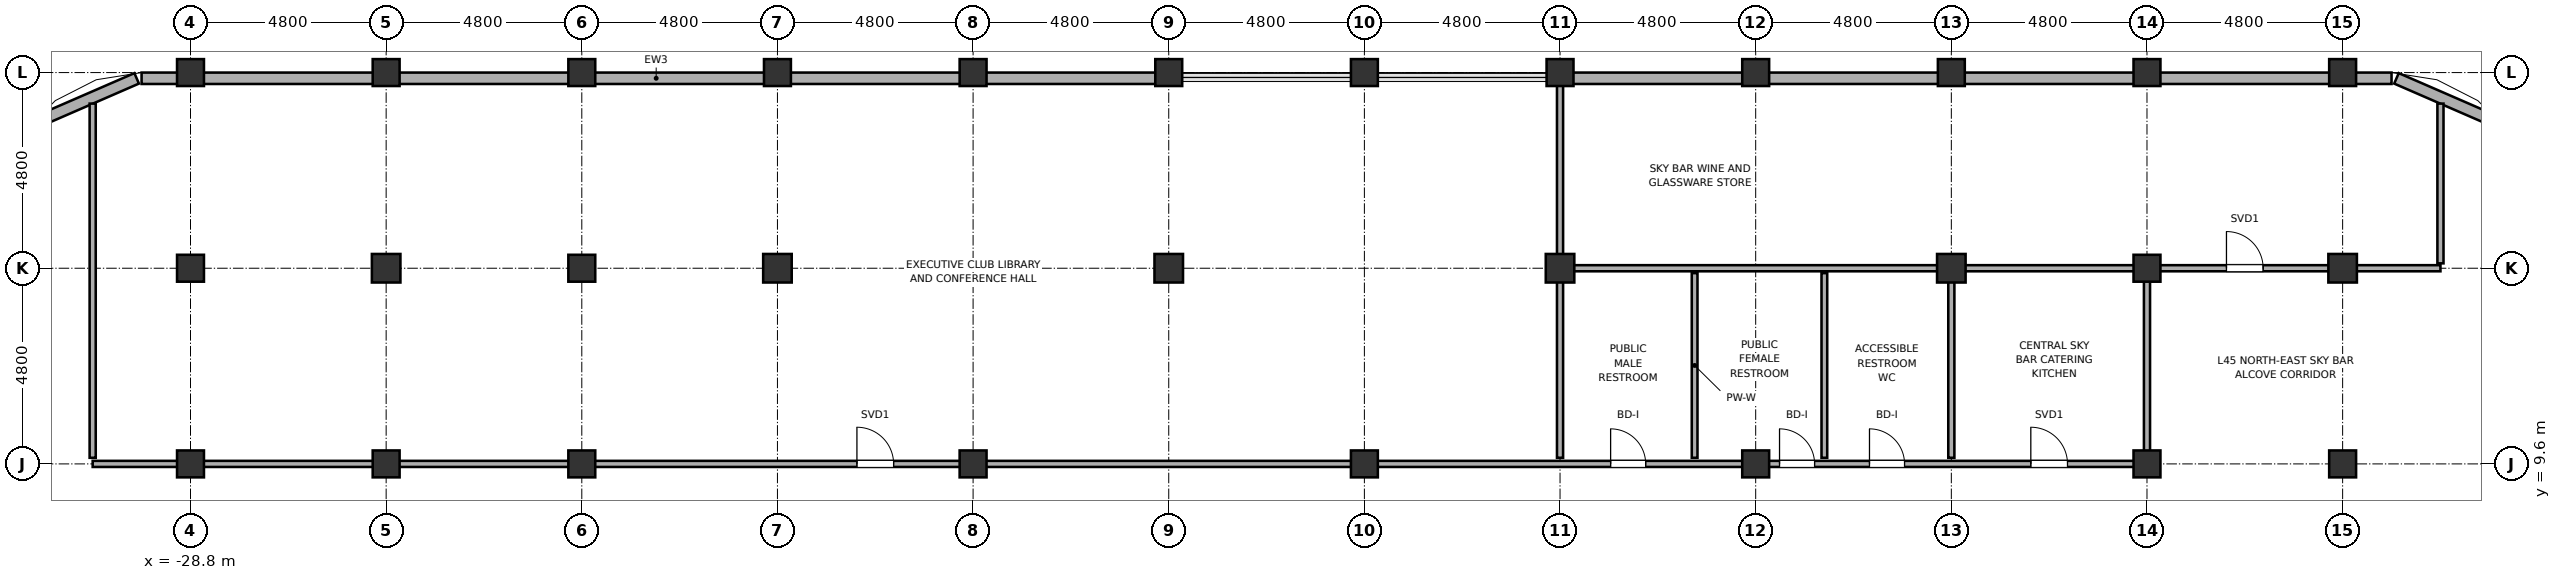
"""IFC4 building model, lengths in metres.
Left out: names, types, materials, properties, quantities, classifications, styles, units other than length and angle.
Written with IfcOpenShell. Run it as: python <this file> out.ifc"""

import sys

from ifc_helpers import new_model, si_unit, direction, frame, frame_2d, origin, origin_2d, place, context, subcontext, project, spatial, rectangle, hollow_rectangle, hollow_circle, extrude, element, fill, save


model = new_model("IFC4")
c1 = context("Model", 3, precision=1e-05, world=origin(), true_north=direction((0.0, 1.0)))
c2 = subcontext(c1, "Body", "Model", "MODEL_VIEW")
j1 = project(units=[si_unit("LENGTHUNIT", "METRE"), si_unit("PLANEANGLEUNIT", "RADIAN")], contexts=[c1])
p1 = place(None, origin())
s1 = spatial("IfcSite", under=j1, at=p1, CompositionType="ELEMENT")
p2 = place(p1, origin())
s2 = spatial("IfcBuilding", under=s1, at=p2, CompositionType="ELEMENT")
p3 = place(p2, frame((0.0, 0.0, 180.3)))
s3 = spatial("IfcBuildingStorey", under=s2, at=p3, CompositionType="ELEMENT", Elevation=180.3)
for number, where, z_axis, x_axis in (
    (1, (-28.8, 9.6, 0.0), (0.0, 0.0, 1.0), (1.0, 0.0, 0.0)),
    (2, (-28.8, 14.4, 0.0), (0.0, 0.0, 1.0), (1.0, 0.0, 0.0)),
    (3, (-28.8, 19.2, 0.0), (0.0, 0.0, 1.0), (1.0, 0.0, 0.0)),
    (4, (-24.0, 9.6, 0.0), (0.0, 0.0, 1.0), (1.0, 0.0, 0.0)),
):
    element("IfcColumn", number, at=place(p3, frame(where, z_axis=z_axis, x_axis=x_axis)), inside=s3, PredefinedType="COLUMN", context=c2, shape_type="SweptSolid", body=[
        extrude(hollow_circle(Radius=0.33, WallThickness=0.028, at=origin_2d()), origin(), (0.0, 0.0, 1.0), 5.2),
    ])
p4 = place(p3, frame((-24.0, 14.4, 0.0), z_axis=(0.0, 0.0, 1.0), x_axis=(1.0, 0.0, 0.0)))
e5 = element("IfcColumn", 5, at=p4, inside=s3, PredefinedType="COLUMN", context=c2, shape_type="SweptSolid", body=[
    extrude(hollow_rectangle(XDim=0.7, YDim=0.7, WallThickness=0.032, at=origin_2d()), origin(), (0.0, 0.0, 1.0), 5.2),
])
for number, where, z_axis, x_axis in (
    (6, (-24.0, 19.2, 0.0), (0.0, 0.0, 1.0), (1.0, 0.0, 0.0)),
    (7, (-19.2, 9.6, 0.0), (0.0, 0.0, 1.0), (1.0, 0.0, 0.0)),
    (8, (-19.2, 14.4, 0.0), (0.0, 0.0, 1.0), (1.0, 0.0, 0.0)),
    (9, (-19.2, 19.2, 0.0), (0.0, 0.0, 1.0), (1.0, 0.0, 0.0)),
):
    element("IfcColumn", number, at=place(p3, frame(where, z_axis=z_axis, x_axis=x_axis)), inside=s3, PredefinedType="COLUMN", context=c2, shape_type="SweptSolid", body=[
        extrude(hollow_circle(Radius=0.33, WallThickness=0.028, at=origin_2d()), origin(), (0.0, 0.0, 1.0), 5.2),
    ])
p5 = place(p3, frame((-14.4, 14.4, 0.0), z_axis=(0.0, 0.0, 1.0), x_axis=(1.0, 0.0, 0.0)))
e10 = element("IfcColumn", 10, at=p5, inside=s3, PredefinedType="COLUMN", context=c2, shape_type="SweptSolid", body=[
    extrude(hollow_rectangle(XDim=0.7, YDim=0.7, WallThickness=0.032, at=origin_2d()), origin(), (0.0, 0.0, 1.0), 5.2),
])
for number, where, z_axis, x_axis in (
    (11, (-14.4, 19.2, 0.0), (0.0, 0.0, 1.0), (1.0, 0.0, 0.0)),
    (12, (-9.6, 9.6, 0.0), (0.0, 0.0, 1.0), (1.0, 0.0, 0.0)),
    (13, (-9.6, 19.2, 0.0), (0.0, 0.0, 1.0), (1.0, 0.0, 0.0)),
):
    element("IfcColumn", number, at=place(p3, frame(where, z_axis=z_axis, x_axis=x_axis)), inside=s3, PredefinedType="COLUMN", context=c2, shape_type="SweptSolid", body=[
        extrude(hollow_circle(Radius=0.33, WallThickness=0.028, at=origin_2d()), origin(), (0.0, 0.0, 1.0), 5.2),
    ])
p6 = place(p3, frame((-4.8, 14.4, 0.0), z_axis=(0.0, 0.0, 1.0), x_axis=(1.0, 0.0, 0.0)))
e14 = element("IfcColumn", 14, at=p6, inside=s3, PredefinedType="COLUMN", context=c2, shape_type="SweptSolid", body=[
    extrude(hollow_rectangle(XDim=0.7, YDim=0.7, WallThickness=0.032, at=origin_2d()), origin(), (0.0, 0.0, 1.0), 5.2),
])
for number, where, z_axis, x_axis in (
    (15, (-4.8, 19.2, 0.0), (0.0, 0.0, 1.0), (1.0, 0.0, 0.0)),
    (16, (0.0, 9.6, 0.0), (0.0, 0.0, 1.0), (1.0, 0.0, 0.0)),
    (17, (0.0, 19.2, 0.0), (0.0, 0.0, 1.0), (1.0, 0.0, 0.0)),
):
    element("IfcColumn", number, at=place(p3, frame(where, z_axis=z_axis, x_axis=x_axis)), inside=s3, PredefinedType="COLUMN", context=c2, shape_type="SweptSolid", body=[
        extrude(hollow_circle(Radius=0.33, WallThickness=0.028, at=origin_2d()), origin(), (0.0, 0.0, 1.0), 5.2),
    ])
p7 = place(p3, frame((4.8, 14.4, 0.0), z_axis=(0.0, 0.0, 1.0), x_axis=(1.0, 0.0, 0.0)))
e18 = element("IfcColumn", 18, at=p7, inside=s3, PredefinedType="COLUMN", context=c2, shape_type="SweptSolid", body=[
    extrude(hollow_rectangle(XDim=0.7, YDim=0.7, WallThickness=0.032, at=origin_2d()), origin(), (0.0, 0.0, 1.0), 5.2),
])
for number, where, z_axis, x_axis in (
    (19, (4.8, 19.2, 0.0), (0.0, 0.0, 1.0), (1.0, 0.0, 0.0)),
    (20, (9.6, 9.6, 0.0), (0.0, 0.0, 1.0), (1.0, 0.0, 0.0)),
    (21, (9.6, 19.2, 0.0), (0.0, 0.0, 1.0), (1.0, 0.0, 0.0)),
):
    element("IfcColumn", number, at=place(p3, frame(where, z_axis=z_axis, x_axis=x_axis)), inside=s3, PredefinedType="COLUMN", context=c2, shape_type="SweptSolid", body=[
        extrude(hollow_circle(Radius=0.33, WallThickness=0.028, at=origin_2d()), origin(), (0.0, 0.0, 1.0), 5.2),
    ])
p8 = place(p3, frame((14.4, 14.4, 0.0), z_axis=(0.0, 0.0, 1.0), x_axis=(1.0, 0.0, 0.0)))
e22 = element("IfcColumn", 22, at=p8, inside=s3, PredefinedType="COLUMN", context=c2, shape_type="SweptSolid", body=[
    extrude(hollow_rectangle(XDim=0.7, YDim=0.7, WallThickness=0.032, at=origin_2d()), origin(), (0.0, 0.0, 1.0), 5.2),
])
for number, where, z_axis, x_axis in (
    (23, (14.4, 19.2, 0.0), (0.0, 0.0, 1.0), (1.0, 0.0, 0.0)),
    (24, (19.2, 9.6, 0.0), (0.0, 0.0, 1.0), (1.0, 0.0, 0.0)),
    (25, (19.2, 14.4, 0.0), (0.0, 0.0, 1.0), (1.0, 0.0, 0.0)),
    (26, (19.2, 19.2, 0.0), (0.0, 0.0, 1.0), (1.0, 0.0, 0.0)),
    (27, (24.0, 9.6, 0.0), (0.0, 0.0, 1.0), (1.0, 0.0, 0.0)),
):
    element("IfcColumn", number, at=place(p3, frame(where, z_axis=z_axis, x_axis=x_axis)), inside=s3, PredefinedType="COLUMN", context=c2, shape_type="SweptSolid", body=[
        extrude(hollow_circle(Radius=0.33, WallThickness=0.028, at=origin_2d()), origin(), (0.0, 0.0, 1.0), 5.2),
    ])
p9 = place(p3, frame((24.0, 14.4, 0.0), z_axis=(0.0, 0.0, 1.0), x_axis=(1.0, 0.0, 0.0)))
e28 = element("IfcColumn", 28, at=p9, inside=s3, PredefinedType="COLUMN", context=c2, shape_type="SweptSolid", body=[
    extrude(hollow_rectangle(XDim=0.7, YDim=0.7, WallThickness=0.032, at=origin_2d()), origin(), (0.0, 0.0, 1.0), 5.2),
])
p10 = place(p3, frame((24.0, 19.2, 0.0), z_axis=(0.0, 0.0, 1.0), x_axis=(1.0, 0.0, 0.0)))
e29 = element("IfcColumn", 29, at=p10, inside=s3, PredefinedType="COLUMN", context=c2, shape_type="SweptSolid", body=[
    extrude(hollow_circle(Radius=0.33, WallThickness=0.028, at=origin_2d()), origin(), (0.0, 0.0, 1.0), 5.2),
])
for number, where, z_axis, x_axis in (
    (30, (27.646, 18.047, 0.0), (0.0, 0.0, 1.0), (-0.917, 0.399, 0.0)),
    (31, (-30.121, 19.058, 0.0), (0.0, 0.0, 1.0), (-0.917, -0.399, 0.0)),
):
    element("IfcWall", number, at=place(p3, frame(where, z_axis=z_axis, x_axis=x_axis)), inside=s3, PredefinedType="SOLIDWALL", context=c2, shape_type="SweptSolid", body=[
        extrude(rectangle(XDim=2.536, YDim=0.28, at=frame_2d((1.268, 0.0))), origin(), (0.0, 0.0, 1.0), 3.55),
    ])
p11 = place(p3, frame((-30.0, 19.06, 0.0), z_axis=(0.0, 0.0, 1.0), x_axis=(1.0, 0.0, 0.0)))
e32 = element("IfcWall", 32, at=p11, inside=s3, PredefinedType="SOLIDWALL", context=c2, shape_type="SweptSolid", body=[
    extrude(rectangle(XDim=25.25, YDim=0.28, at=frame_2d((12.625, 0.0))), origin(), (0.0, 0.0, 1.0), 3.55),
])
p12 = place(p3, frame((4.75, 19.06, 0.0), z_axis=(0.0, 0.0, 1.0), x_axis=(1.0, 0.0, 0.0)))
e33 = element("IfcWall", 33, at=p12, inside=s3, PredefinedType="SOLIDWALL", context=c2, shape_type="SweptSolid", body=[
    extrude(rectangle(XDim=20.45, YDim=0.28, at=frame_2d((10.225, 0.0))), origin(), (0.0, 0.0, 1.0), 3.55),
])
p13 = place(p3, frame((-31.2, 9.6, 0.0), z_axis=(0.0, 0.0, 1.0), x_axis=(1.0, 0.0, 0.0)))
e34 = element("IfcWall", 34, at=p13, inside=s3, PredefinedType="PARTITIONING", context=c2, shape_type="SweptSolid", body=[
    extrude(rectangle(XDim=50.28, YDim=0.15, at=frame_2d((25.14, 0.0))), origin(), (0.0, 0.0, 1.0), 3.55),
])
p14 = place(p13, frame((18.75, 0.0, 0.0)))
e35 = element("IfcOpeningElement", 35, at=p14, cuts=e34, PredefinedType="OPENING", context=c2, shape_type="SweptSolid", body=[
    extrude(rectangle(XDim=0.9, YDim=2.1, at=frame_2d((0.45, 1.05))), frame((0.0, 0.09, 0.0), z_axis=(0.0, -1.0, 0.0), x_axis=(1.0, 0.0, 0.0)), (0.0, 0.0, 1.0), 0.18),
])
p15 = place(p13, frame((37.241, 0.0, 0.0)))
e36 = element("IfcOpeningElement", 36, at=p15, cuts=e34, PredefinedType="OPENING", context=c2, shape_type="SweptSolid", body=[
    extrude(rectangle(XDim=0.86, YDim=2.1, at=frame_2d((0.43, 1.05))), frame((0.0, 0.09, 0.0), z_axis=(0.0, -1.0, 0.0), x_axis=(1.0, 0.0, 0.0)), (0.0, 0.0, 1.0), 0.18),
])
p16 = place(p13, frame((41.385, 0.0, 0.0)))
e37 = element("IfcOpeningElement", 37, at=p16, cuts=e34, PredefinedType="OPENING", context=c2, shape_type="SweptSolid", body=[
    extrude(rectangle(XDim=0.86, YDim=2.1, at=frame_2d((0.43, 1.05))), frame((0.0, 0.09, 0.0), z_axis=(0.0, -1.0, 0.0), x_axis=(1.0, 0.0, 0.0)), (0.0, 0.0, 1.0), 0.18),
])
p17 = place(p13, frame((43.592, 0.0, 0.0)))
e38 = element("IfcOpeningElement", 38, at=p17, cuts=e34, PredefinedType="OPENING", context=c2, shape_type="SweptSolid", body=[
    extrude(rectangle(XDim=0.86, YDim=2.1, at=frame_2d((0.43, 1.05))), frame((0.0, 0.09, 0.0), z_axis=(0.0, -1.0, 0.0), x_axis=(1.0, 0.0, 0.0)), (0.0, 0.0, 1.0), 0.18),
])
p18 = place(p13, frame((47.55, 0.0, 0.0)))
e39 = element("IfcOpeningElement", 39, at=p18, cuts=e34, PredefinedType="OPENING", context=c2, shape_type="SweptSolid", body=[
    extrude(rectangle(XDim=0.9, YDim=2.1, at=frame_2d((0.45, 1.05))), frame((0.0, 0.09, 0.0), z_axis=(0.0, -1.0, 0.0), x_axis=(1.0, 0.0, 0.0)), (0.0, 0.0, 1.0), 0.18),
])
p19 = place(p3, frame((4.92, 14.4, 0.0), z_axis=(0.0, 0.0, 1.0), x_axis=(1.0, 0.0, 0.0)))
e40 = element("IfcWall", 40, at=p19, inside=s3, PredefinedType="PARTITIONING", context=c2, shape_type="SweptSolid", body=[
    extrude(rectangle(XDim=21.48, YDim=0.15, at=frame_2d((10.74, 0.0))), origin(), (0.0, 0.0, 1.0), 3.55),
])
p20 = place(p19, frame((16.23, 0.0, 0.0)))
e41 = element("IfcOpeningElement", 41, at=p20, cuts=e40, PredefinedType="OPENING", context=c2, shape_type="SweptSolid", body=[
    extrude(rectangle(XDim=0.9, YDim=2.1, at=frame_2d((0.45, 1.05))), frame((0.0, 0.09, 0.0), z_axis=(0.0, -1.0, 0.0), x_axis=(1.0, 0.0, 0.0)), (0.0, 0.0, 1.0), 0.18),
])
p21 = place(p3, frame((-31.2, 9.75, 0.0), z_axis=(0.0, 0.0, 1.0), x_axis=(0.0, 1.0, 0.0)))
e42 = element("IfcWall", 42, at=p21, inside=s3, PredefinedType="PARTITIONING", context=c2, shape_type="SweptSolid", body=[
    extrude(rectangle(XDim=8.689, YDim=0.15, at=frame_2d((4.344, 0.0))), origin(), (0.0, 0.0, 1.0), 3.55),
])
p22 = place(p3, frame((4.8, 9.75, 0.0), z_axis=(0.0, 0.0, 1.0), x_axis=(0.0, 1.0, 0.0)))
e43 = element("IfcWall", 43, at=p22, inside=s3, PredefinedType="PARTITIONING", context=c2, shape_type="SweptSolid", body=[
    extrude(rectangle(XDim=9.16, YDim=0.15, at=frame_2d((4.58, 0.0))), origin(), (0.0, 0.0, 1.0), 3.55),
])
for number, where, z_axis, x_axis in (
    (44, (8.102, 9.75, 0.0), (0.0, 0.0, 1.0), (0.0, 1.0, 0.0)),
    (45, (11.285, 9.75, 0.0), (0.0, 0.0, 1.0), (0.0, 1.0, 0.0)),
):
    element("IfcWall", number, at=place(p3, frame(where, z_axis=z_axis, x_axis=x_axis)), inside=s3, PredefinedType="PLUMBINGWALL", context=c2, shape_type="SweptSolid", body=[
        extrude(rectangle(XDim=4.53, YDim=0.14, at=frame_2d((2.265, 0.0))), origin(), (0.0, 0.0, 1.0), 3.55),
    ])
for number, where, z_axis, x_axis in (
    (46, (14.4, 9.75, 0.0), (0.0, 0.0, 1.0), (0.0, 1.0, 0.0)),
    (47, (19.2, 9.75, 0.0), (0.0, 0.0, 1.0), (0.0, 1.0, 0.0)),
):
    element("IfcWall", number, at=place(p3, frame(where, z_axis=z_axis, x_axis=x_axis)), inside=s3, PredefinedType="PARTITIONING", context=c2, shape_type="SweptSolid", body=[
        extrude(rectangle(XDim=4.53, YDim=0.15, at=frame_2d((2.265, 0.0))), origin(), (0.0, 0.0, 1.0), 3.55),
    ])
p23 = place(p3, frame((26.4, 14.52, 0.0), z_axis=(0.0, 0.0, 1.0), x_axis=(0.0, 1.0, 0.0)))
e48 = element("IfcWall", 48, at=p23, inside=s3, PredefinedType="PARTITIONING", context=c2, shape_type="SweptSolid", body=[
    extrude(rectangle(XDim=3.919, YDim=0.15, at=frame_2d((1.959, 0.0))), origin(), (0.0, 0.0, 1.0), 3.55),
])
p24 = place(p14, origin())
e49 = element("IfcDoor", 49, at=p24, inside=s3, OperationType="SINGLE_SWING_RIGHT", PredefinedType="DOOR", context=c2, shape_type="SweptSolid", body=[
    extrude(rectangle(XDim=0.9, YDim=2.1, at=frame_2d((0.45, 1.05))), frame((0.0, 0.025, 0.0), z_axis=(0.0, -1.0, 0.0), x_axis=(1.0, 0.0, 0.0)), (0.0, 0.0, 1.0), 0.05),
])
fill(e35, e49)
p25 = place(p15, origin())
e50 = element("IfcDoor", 50, at=p25, inside=s3, OperationType="SINGLE_SWING_LEFT", PredefinedType="DOOR", context=c2, shape_type="SweptSolid", body=[
    extrude(rectangle(XDim=0.86, YDim=2.1, at=frame_2d((0.43, 1.05))), frame((0.0, 0.025, 0.0), z_axis=(0.0, -1.0, 0.0), x_axis=(1.0, 0.0, 0.0)), (0.0, 0.0, 1.0), 0.05),
])
fill(e36, e50)
p26 = place(p16, origin())
e51 = element("IfcDoor", 51, at=p26, inside=s3, OperationType="SINGLE_SWING_RIGHT", PredefinedType="DOOR", context=c2, shape_type="SweptSolid", body=[
    extrude(rectangle(XDim=0.86, YDim=2.1, at=frame_2d((0.43, 1.05))), frame((0.0, 0.025, 0.0), z_axis=(0.0, -1.0, 0.0), x_axis=(1.0, 0.0, 0.0)), (0.0, 0.0, 1.0), 0.05),
])
fill(e37, e51)
p27 = place(p17, origin())
e52 = element("IfcDoor", 52, at=p27, inside=s3, OperationType="SINGLE_SWING_RIGHT", PredefinedType="DOOR", context=c2, shape_type="SweptSolid", body=[
    extrude(rectangle(XDim=0.86, YDim=2.1, at=frame_2d((0.43, 1.05))), frame((0.0, 0.025, 0.0), z_axis=(0.0, -1.0, 0.0), x_axis=(1.0, 0.0, 0.0)), (0.0, 0.0, 1.0), 0.05),
])
fill(e38, e52)
p28 = place(p18, origin())
e53 = element("IfcDoor", 53, at=p28, inside=s3, OperationType="SINGLE_SWING_LEFT", PredefinedType="DOOR", context=c2, shape_type="SweptSolid", body=[
    extrude(rectangle(XDim=0.9, YDim=2.1, at=frame_2d((0.45, 1.05))), frame((0.0, 0.025, 0.0), z_axis=(0.0, -1.0, 0.0), x_axis=(1.0, 0.0, 0.0)), (0.0, 0.0, 1.0), 0.05),
])
fill(e39, e53)
p29 = place(p20, origin())
e54 = element("IfcDoor", 54, at=p29, inside=s3, OperationType="SINGLE_SWING_LEFT", PredefinedType="DOOR", context=c2, shape_type="SweptSolid", body=[
    extrude(rectangle(XDim=0.9, YDim=2.1, at=frame_2d((0.45, 1.05))), frame((0.0, 0.025, 0.0), z_axis=(0.0, -1.0, 0.0), x_axis=(1.0, 0.0, 0.0)), (0.0, 0.0, 1.0), 0.05),
])
fill(e41, e54)
save(model, sys.argv[1])
